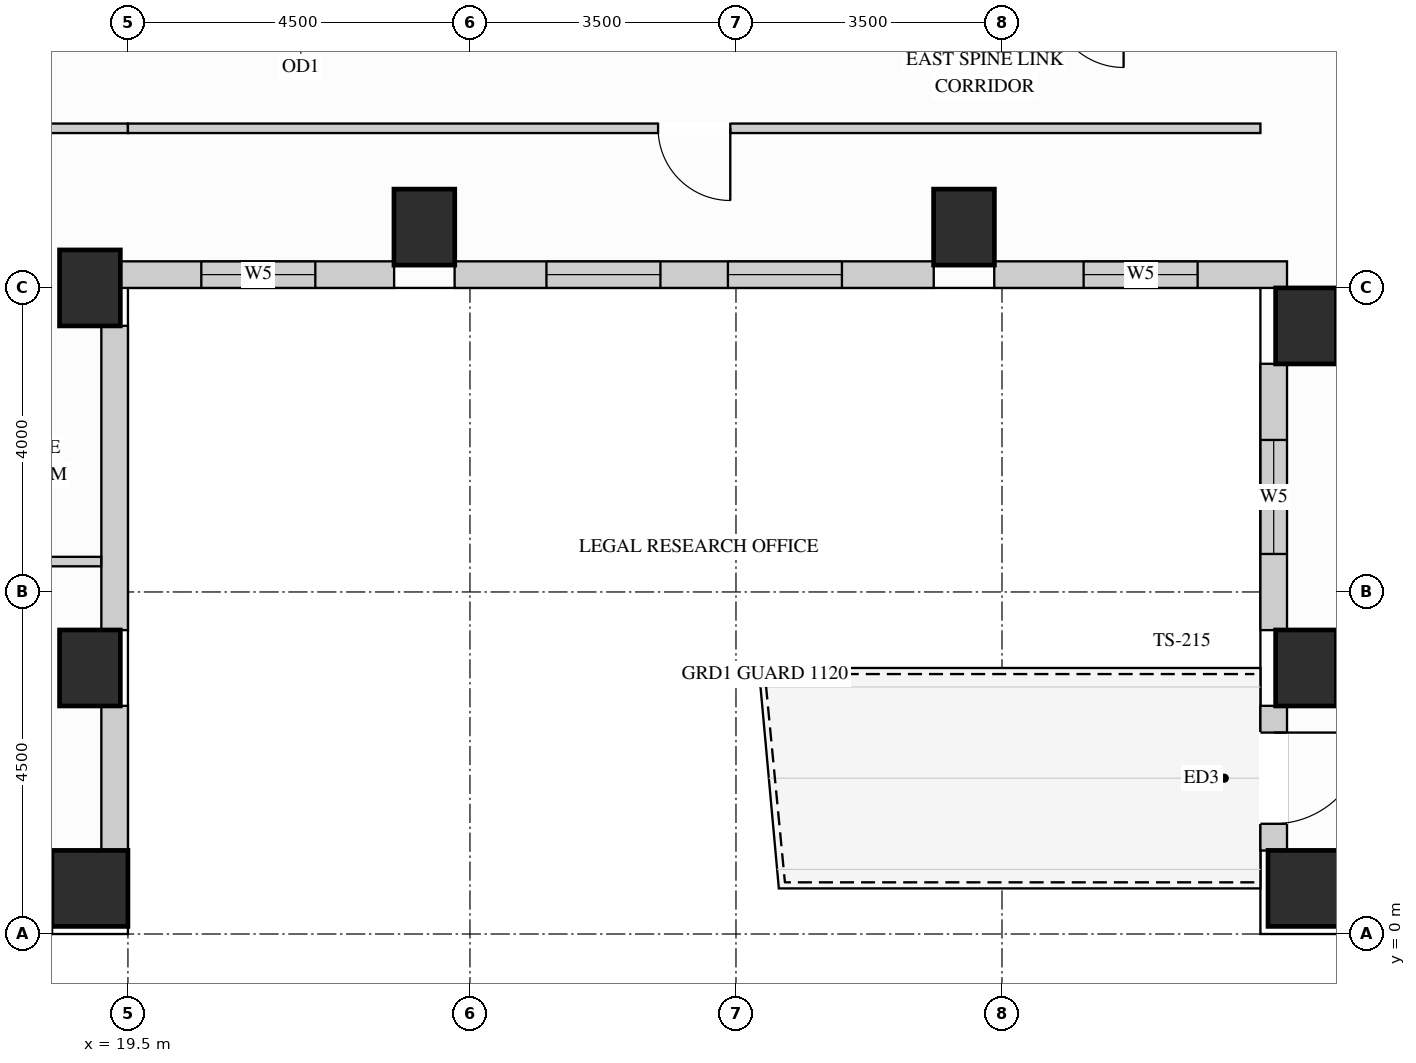
"""IFC4 building model, lengths in metres.
Left out: names, types, materials, properties, quantities, classifications, styles, units other than length and angle.
Written with IfcOpenShell. Run it as: python <this file> out.ifc"""

import sys

from ifc_helpers import new_model, si_unit, direction, frame, frame_2d, origin, origin_2d, place, context, subcontext, project, spatial, rectangle, extrude, source, transform, mapped, element, fill, save


model = new_model("IFC4")
c1 = context("Model", 3, precision=1e-05, world=origin(), true_north=direction((0.0, 1.0)))
c2 = subcontext(c1, "Body", "Model", "MODEL_VIEW")
j1 = project(units=[si_unit("LENGTHUNIT", "METRE"), si_unit("PLANEANGLEUNIT", "RADIAN")], contexts=[c1])
p1 = place(None, origin())
s1 = spatial("IfcSite", under=j1, at=p1, CompositionType="ELEMENT")
p2 = place(p1, origin())
s2 = spatial("IfcBuilding", under=s1, at=p2, CompositionType="ELEMENT")
p3 = place(p2, frame((0.0, 0.0, 179.1)))
s3 = spatial("IfcBuildingStorey", under=s2, at=p3, CompositionType="ELEMENT", Elevation=179.1)
m1 = source(origin(), c2, "Body", "SweptSolid", [
    extrude(rectangle(XDim=0.8, YDim=1.0, at=origin_2d()), origin(), (0.0, 0.0, 1.0), 3.4),
])
for number, where, z_axis, x_axis in (
    (1, (19.0, 3.5, 0.0), (0.0, 0.0, 1.0), (1.0, 0.0, 0.0)),
    (2, (19.0, 8.5, 0.0), (0.0, 0.0, 1.0), (1.0, 0.0, 0.0)),
    (3, (35.0, 3.5, 0.0), (0.0, 0.0, 1.0), (1.0, 0.0, 0.0)),
    (4, (35.0, 8.0, 0.0), (0.0, 0.0, 1.0), (1.0, 0.0, 0.0)),
    (5, (23.4, 9.3, 0.0), (0.0, 0.0, 1.0), (1.0, 0.0, 0.0)),
    (6, (30.5, 9.3, 0.0), (0.0, 0.0, 1.0), (1.0, 0.0, 0.0)),
):
    element("IfcColumn", number, at=place(p3, frame(where, z_axis=z_axis, x_axis=x_axis)), inside=s3, PredefinedType="COLUMN", context=c2, shape_type="MappedRepresentation", body=[
        mapped(m1, transform((0.0, 0.0, 0.0), x_axis=(1.0, 0.0, 0.0), y_axis=(0.0, 1.0, 0.0), z_axis=(0.0, 0.0, 1.0))),
    ])
m2 = source(origin(), c2, "Body", "SweptSolid", [
    extrude(rectangle(XDim=1.0, YDim=1.0, at=origin_2d()), origin(), (0.0, 0.0, 1.0), 3.4),
])
for number, where, z_axis, x_axis in (
    (7, (19.0, 0.6, 0.0), (0.0, 0.0, 1.0), (1.0, 0.0, 0.0)),
    (8, (35.0, 0.6, 0.0), (0.0, 0.0, 1.0), (1.0, 0.0, 0.0)),
):
    element("IfcColumn", number, at=place(p3, frame(where, z_axis=z_axis, x_axis=x_axis)), inside=s3, PredefinedType="COLUMN", context=c2, shape_type="MappedRepresentation", body=[
        mapped(m2, transform((0.0, 0.0, 0.0), x_axis=(1.0, 0.0, 0.0), y_axis=(0.0, 1.0, 0.0), z_axis=(0.0, 0.0, 1.0))),
    ])
p4 = place(p3, frame((14.998, 0.175, 0.0), z_axis=(0.0, 0.0, 1.0), x_axis=(1.0, 0.0, 0.0)))
e9 = element("IfcWall", 9, at=p4, inside=s3, PredefinedType="SOLIDWALL", context=c2, shape_type="SweptSolid", body=[
    extrude(rectangle(XDim=3.504, YDim=0.35, at=frame_2d((1.752, 0.0))), origin(), (0.0, 0.0, 1.0), 2.612),
])
p5 = place(p4, frame((0.552, 0.0, 0.78)))
e10 = element("IfcOpeningElement", 10, at=p5, cuts=e9, PredefinedType="OPENING", context=c2, shape_type="SweptSolid", body=[
    extrude(rectangle(XDim=2.4, YDim=1.652, at=frame_2d((1.2, 0.826))), frame((0.0, 0.185, 0.0), z_axis=(0.0, -1.0, 0.0), x_axis=(1.0, 0.0, 0.0)), (0.0, 0.0, 1.0), 0.37),
])
m3 = source(origin(), c2, "Body", "SweptSolid", [
    extrude(rectangle(XDim=1.904, YDim=0.35, at=frame_2d((0.952, 0.0))), origin(), (0.0, 0.0, 1.0), 2.612),
])
p6 = place(p3, frame((19.325, 1.098, 0.0), z_axis=(0.0, 0.0, 1.0), x_axis=(0.0, 1.0, 0.0)))
e11 = element("IfcWall", 11, at=p6, inside=s3, PredefinedType="SOLIDWALL", context=c2, shape_type="MappedRepresentation", body=[
    mapped(m3, transform((0.0, 0.0, 0.0), x_axis=(1.0, 0.0, 0.0), y_axis=(0.0, 1.0, 0.0), z_axis=(0.0, 0.0, 1.0))),
])
m4 = source(origin(), c2, "Body", "SweptSolid", [
    extrude(rectangle(XDim=4.004, YDim=0.35, at=frame_2d((2.002, 0.0))), origin(), (0.0, 0.0, 1.0), 2.612),
])
p7 = place(p3, frame((19.325, 3.998, 0.0), z_axis=(0.0, 0.0, 1.0), x_axis=(0.0, 1.0, 0.0)))
e12 = element("IfcWall", 12, at=p7, inside=s3, PredefinedType="SOLIDWALL", context=c2, shape_type="MappedRepresentation", body=[
    mapped(m4, transform((0.0, 0.0, 0.0), x_axis=(1.0, 0.0, 0.0), y_axis=(0.0, 1.0, 0.0), z_axis=(0.0, 0.0, 1.0))),
])
p8 = place(p3, frame((19.398, 8.675, 0.0), z_axis=(0.0, 0.0, 1.0), x_axis=(1.0, 0.0, 0.0)))
e13 = element("IfcWall", 13, at=p8, inside=s3, PredefinedType="SOLIDWALL", context=c2, shape_type="SweptSolid", body=[
    extrude(rectangle(XDim=3.604, YDim=0.35, at=frame_2d((1.802, 0.0))), origin(), (0.0, 0.0, 1.0), 3.385),
])
p9 = place(p8, frame((1.067, 0.0, 0.78)))
e14 = element("IfcOpeningElement", 14, at=p9, cuts=e13, PredefinedType="OPENING", context=c2, shape_type="SweptSolid", body=[
    extrude(rectangle(XDim=1.5, YDim=2.0, at=frame_2d((0.75, 1.0))), frame((0.0, 0.185, 0.0), z_axis=(0.0, -1.0, 0.0), x_axis=(1.0, 0.0, 0.0)), (0.0, 0.0, 1.0), 0.37),
])
p10 = place(p3, frame((23.798, 8.675, 0.0), z_axis=(0.0, 0.0, 1.0), x_axis=(1.0, 0.0, 0.0)))
e15 = element("IfcWall", 15, at=p10, inside=s3, PredefinedType="SOLIDWALL", context=c2, shape_type="SweptSolid", body=[
    extrude(rectangle(XDim=6.304, YDim=0.35, at=frame_2d((3.152, 0.0))), origin(), (0.0, 0.0, 1.0), 3.385),
])
p11 = place(p10, frame((1.208, 0.0, 0.78)))
e16 = element("IfcOpeningElement", 16, at=p11, cuts=e15, PredefinedType="OPENING", context=c2, shape_type="SweptSolid", body=[
    extrude(rectangle(XDim=1.5, YDim=2.0, at=frame_2d((0.75, 1.0))), frame((0.0, 0.185, 0.0), z_axis=(0.0, -1.0, 0.0), x_axis=(1.0, 0.0, 0.0)), (0.0, 0.0, 1.0), 0.37),
])
p12 = place(p10, frame((3.596, 0.0, 0.78)))
e17 = element("IfcOpeningElement", 17, at=p12, cuts=e15, PredefinedType="OPENING", context=c2, shape_type="SweptSolid", body=[
    extrude(rectangle(XDim=1.5, YDim=2.0, at=frame_2d((0.75, 1.0))), frame((0.0, 0.185, 0.0), z_axis=(0.0, -1.0, 0.0), x_axis=(1.0, 0.0, 0.0)), (0.0, 0.0, 1.0), 0.37),
])
p13 = place(p3, frame((30.898, 8.675, 0.0), z_axis=(0.0, 0.0, 1.0), x_axis=(1.0, 0.0, 0.0)))
e18 = element("IfcWall", 18, at=p13, inside=s3, PredefinedType="SOLIDWALL", context=c2, shape_type="SweptSolid", body=[
    extrude(rectangle(XDim=3.852, YDim=0.35, at=frame_2d((1.926, 0.0))), origin(), (0.0, 0.0, 1.0), 3.385),
])
p14 = place(p13, frame((1.176, 0.0, 0.78)))
e19 = element("IfcOpeningElement", 19, at=p14, cuts=e18, PredefinedType="OPENING", context=c2, shape_type="SweptSolid", body=[
    extrude(rectangle(XDim=1.5, YDim=2.0, at=frame_2d((0.75, 1.0))), frame((0.0, 0.185, 0.0), z_axis=(0.0, -1.0, 0.0), x_axis=(1.0, 0.0, 0.0)), (0.0, 0.0, 1.0), 0.37),
])
p15 = place(p3, frame((34.575, 7.502, 0.0), z_axis=(0.0, 0.0, 1.0), x_axis=(0.0, -1.0, 0.0)))
e20 = element("IfcWall", 20, at=p15, inside=s3, PredefinedType="SOLIDWALL", context=c2, shape_type="SweptSolid", body=[
    extrude(rectangle(XDim=3.504, YDim=0.35, at=frame_2d((1.752, 0.0))), origin(), (0.0, 0.0, 1.0), 2.612),
])
p16 = place(p15, frame((1.002, 0.0, 0.78)))
e21 = element("IfcOpeningElement", 21, at=p16, cuts=e20, PredefinedType="OPENING", context=c2, shape_type="SweptSolid", body=[
    extrude(rectangle(XDim=1.5, YDim=1.652, at=frame_2d((0.75, 0.826))), frame((0.0, 0.185, 0.0), z_axis=(0.0, -1.0, 0.0), x_axis=(1.0, 0.0, 0.0)), (0.0, 0.0, 1.0), 0.37),
])
p17 = place(p3, frame((34.575, 3.002, 0.0), z_axis=(0.0, 0.0, 1.0), x_axis=(0.0, -1.0, 0.0)))
e22 = element("IfcWall", 22, at=p17, inside=s3, PredefinedType="SOLIDWALL", context=c2, shape_type="SweptSolid", body=[
    extrude(rectangle(XDim=1.904, YDim=0.35, at=frame_2d((0.952, 0.0))), origin(), (0.0, 0.0, 1.0), 2.612),
])
p18 = place(p17, frame((0.352, 0.0, 0.0)))
e23 = element("IfcOpeningElement", 23, at=p18, cuts=e22, PredefinedType="OPENING", context=c2, shape_type="SweptSolid", body=[
    extrude(rectangle(XDim=1.2, YDim=2.15, at=frame_2d((0.6, 1.075))), frame((0.0, 0.185, 0.0), z_axis=(0.0, -1.0, 0.0), x_axis=(1.0, 0.0, 0.0)), (0.0, 0.0, 1.0), 0.37),
])
m5 = source(origin(), c2, "Body", "SweptSolid", [
    extrude(rectangle(XDim=2.95, YDim=0.125, at=frame_2d((1.475, 0.0))), origin(), (0.0, 0.0, 1.0), 3.385),
])
p19 = place(p3, frame((16.55, 10.6, 0.0), z_axis=(0.0, 0.0, 1.0), x_axis=(1.0, 0.0, 0.0)))
e24 = element("IfcWall", 24, at=p19, inside=s3, PredefinedType="PARTITIONING", context=c2, shape_type="MappedRepresentation", body=[
    mapped(m5, transform((0.0, 0.0, 0.0), x_axis=(1.0, 0.0, 0.0), y_axis=(0.0, 1.0, 0.0), z_axis=(0.0, 0.0, 1.0))),
])
p20 = place(p3, frame((19.5, 10.6, 0.0), z_axis=(0.0, 0.0, 1.0), x_axis=(1.0, 0.0, 0.0)))
e25 = element("IfcWall", 25, at=p20, inside=s3, PredefinedType="PARTITIONING", context=c2, shape_type="SweptSolid", body=[
    extrude(rectangle(XDim=14.9, YDim=0.125, at=frame_2d((7.45, 0.0))), origin(), (0.0, 0.0, 1.0), 3.385),
])
p21 = place(p20, frame((6.975, 0.0, 0.0)))
e26 = element("IfcOpeningElement", 26, at=p21, cuts=e25, PredefinedType="OPENING", context=c2, shape_type="SweptSolid", body=[
    extrude(rectangle(XDim=0.95, YDim=2.15, at=frame_2d((0.475, 1.075))), frame((0.0, 0.073, 0.0), z_axis=(0.0, -1.0, 0.0), x_axis=(1.0, 0.0, 0.0)), (0.0, 0.0, 1.0), 0.145),
])
m6 = source(origin(), c2, "Body", "SweptSolid", [
    extrude(rectangle(XDim=2.598, YDim=0.125, at=frame_2d((1.299, 0.0))), origin(), (0.0, 0.0, 1.0), 2.848),
])
p22 = place(p3, frame((16.55, 4.9, 0.0), z_axis=(0.0, 0.0, 1.0), x_axis=(1.0, 0.0, 0.0)))
e27 = element("IfcWall", 27, at=p22, inside=s3, PredefinedType="PARTITIONING", context=c2, shape_type="MappedRepresentation", body=[
    mapped(m6, transform((0.0, 0.0, 0.0), x_axis=(1.0, 0.0, 0.0), y_axis=(0.0, 1.0, 0.0), z_axis=(0.0, 0.0, 1.0))),
])
m7 = source(origin(), c2, "Body", "SweptSolid", [
    extrude(rectangle(XDim=1.2, YDim=2.15, at=frame_2d((0.6, 1.075))), frame((0.0, 0.025, 0.0), z_axis=(0.0, -1.0, 0.0), x_axis=(1.0, 0.0, 0.0)), (0.0, 0.0, 1.0), 0.05),
])
p23 = place(p18, frame((1.2, 0.0, 0.0), z_axis=(0.0, 0.0, 1.0), x_axis=(-1.0, 0.0, 0.0)))
e28 = element("IfcDoor", 28, at=p23, inside=s3, OperationType="SINGLE_SWING_LEFT", PredefinedType="DOOR", context=c2, shape_type="MappedRepresentation", body=[
    mapped(m7, transform((0.0, 0.0, 0.0), x_axis=(1.0, 0.0, 0.0), y_axis=(0.0, 1.0, 0.0), z_axis=(0.0, 0.0, 1.0))),
])
fill(e23, e28)
m8 = source(origin(), c2, "Body", "SweptSolid", [
    extrude(rectangle(XDim=0.95, YDim=2.15, at=frame_2d((0.475, 1.075))), frame((0.0, 0.025, 0.0), z_axis=(0.0, -1.0, 0.0), x_axis=(1.0, 0.0, 0.0)), (0.0, 0.0, 1.0), 0.05),
])
p24 = place(p21, origin())
e29 = element("IfcDoor", 29, at=p24, inside=s3, OperationType="SINGLE_SWING_RIGHT", PredefinedType="DOOR", context=c2, shape_type="MappedRepresentation", body=[
    mapped(m8, transform((0.0, 0.0, 0.0), x_axis=(1.0, 0.0, 0.0), y_axis=(0.0, 1.0, 0.0), z_axis=(0.0, 0.0, 1.0))),
])
fill(e26, e29)
m9 = source(origin(), c2, "Body", "SweptSolid", [
    extrude(rectangle(XDim=1.5, YDim=2.0, at=frame_2d((0.75, 1.0))), frame((0.0, 0.03, 0.0), z_axis=(0.0, -1.0, 0.0), x_axis=(1.0, 0.0, 0.0)), (0.0, 0.0, 1.0), 0.06),
])
p25 = place(p9, origin())
e30 = element("IfcWindow", 30, at=p25, inside=s3, PartitioningType="SINGLE_PANEL", PredefinedType="WINDOW", context=c2, shape_type="MappedRepresentation", body=[
    mapped(m9, transform((0.0, 0.0, 0.0), x_axis=(1.0, 0.0, 0.0), y_axis=(0.0, 1.0, 0.0), z_axis=(0.0, 0.0, 1.0))),
])
fill(e14, e30)
p26 = place(p11, origin())
e31 = element("IfcWindow", 31, at=p26, inside=s3, PartitioningType="SINGLE_PANEL", PredefinedType="WINDOW", context=c2, shape_type="MappedRepresentation", body=[
    mapped(m9, transform((0.0, 0.0, 0.0), x_axis=(1.0, 0.0, 0.0), y_axis=(0.0, 1.0, 0.0), z_axis=(0.0, 0.0, 1.0))),
])
fill(e16, e31)
p27 = place(p12, origin())
e32 = element("IfcWindow", 32, at=p27, inside=s3, PartitioningType="SINGLE_PANEL", PredefinedType="WINDOW", context=c2, shape_type="MappedRepresentation", body=[
    mapped(m9, transform((0.0, 0.0, 0.0), x_axis=(1.0, 0.0, 0.0), y_axis=(0.0, 1.0, 0.0), z_axis=(0.0, 0.0, 1.0))),
])
fill(e17, e32)
p28 = place(p14, origin())
e33 = element("IfcWindow", 33, at=p28, inside=s3, PartitioningType="SINGLE_PANEL", PredefinedType="WINDOW", context=c2, shape_type="MappedRepresentation", body=[
    mapped(m9, transform((0.0, 0.0, 0.0), x_axis=(1.0, 0.0, 0.0), y_axis=(0.0, 1.0, 0.0), z_axis=(0.0, 0.0, 1.0))),
])
fill(e19, e33)
m10 = source(origin(), c2, "Body", "SweptSolid", [
    extrude(rectangle(XDim=1.5, YDim=1.652, at=frame_2d((0.75, 0.826))), frame((0.0, 0.03, 0.0), z_axis=(0.0, -1.0, 0.0), x_axis=(1.0, 0.0, 0.0)), (0.0, 0.0, 1.0), 0.06),
])
p29 = place(p16, origin())
e34 = element("IfcWindow", 34, at=p29, inside=s3, PartitioningType="SINGLE_PANEL", PredefinedType="WINDOW", context=c2, shape_type="MappedRepresentation", body=[
    mapped(m10, transform((0.0, 0.0, 0.0), x_axis=(1.0, 0.0, 0.0), y_axis=(0.0, 1.0, 0.0), z_axis=(0.0, 0.0, 1.0))),
])
fill(e21, e34)
save(model, sys.argv[1])
